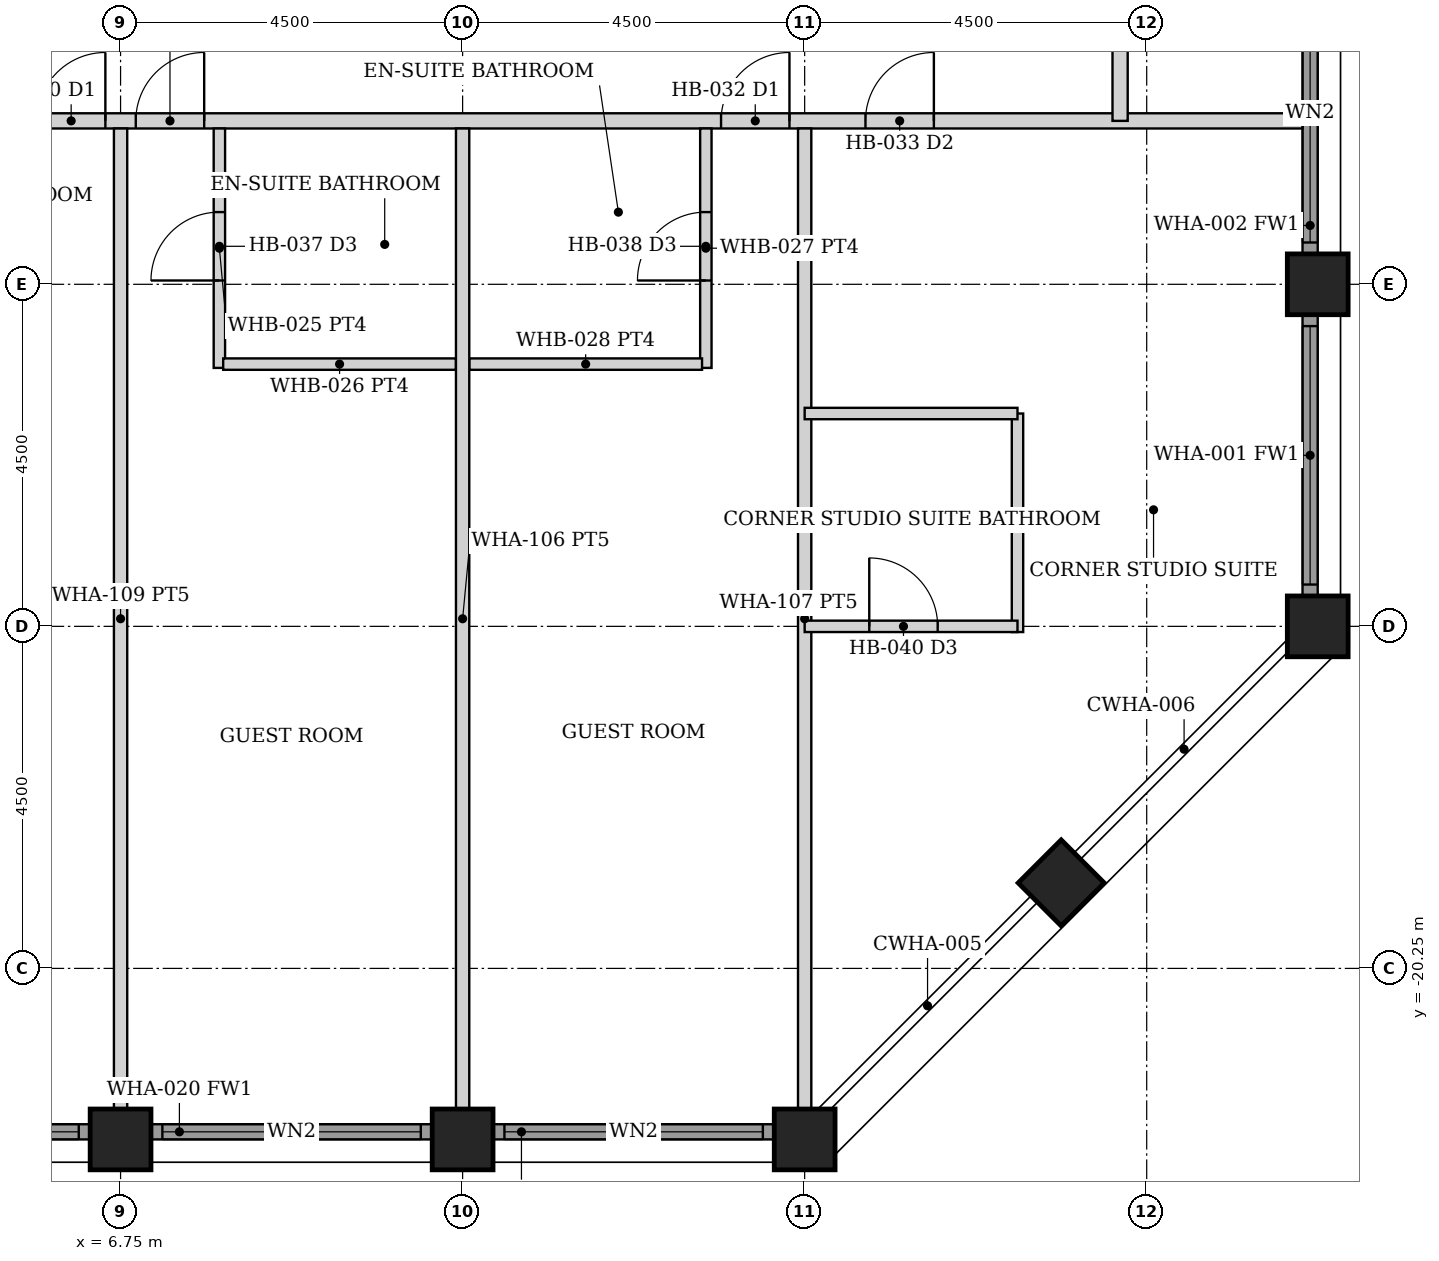
"""IFC4 building model, lengths in metres.
Left out: names, types, materials, properties, quantities, classifications, styles, units other than length and angle.
Written with IfcOpenShell. Run it as: python <this file> out.ifc"""

import sys

from ifc_helpers import new_model, si_unit, direction, frame, frame_2d, origin, origin_2d, place, context, subcontext, project, spatial, rectangle, hollow_rectangle, extrude, element, fill, save


model = new_model("IFC4")
c1 = context("Model", 3, precision=1e-05, world=origin(), true_north=direction((0.0, 1.0)))
c2 = subcontext(c1, "Body", "Model", "MODEL_VIEW")
j1 = project(units=[si_unit("LENGTHUNIT", "METRE"), si_unit("PLANEANGLEUNIT", "RADIAN")], contexts=[c1])
p1 = place(None, origin())
s1 = spatial("IfcSite", under=j1, at=p1, CompositionType="ELEMENT")
p2 = place(p1, origin())
s2 = spatial("IfcBuilding", under=s1, at=p2, CompositionType="ELEMENT")
p3 = place(p2, frame((0.0, 0.0, 129.2)))
s3 = spatial("IfcBuildingStorey", under=s2, at=p3, CompositionType="ELEMENT", Elevation=129.2)
for number, where, z_axis, x_axis in (
    (1, (22.5, -15.75, 0.0), (0.0, 0.0, 1.0), (1.0, 0.0, 0.0)),
    (2, (22.5, -11.25, 0.0), (0.0, 0.0, 1.0), (1.0, 0.0, 0.0)),
    (3, (6.75, -22.5, 0.0), (0.0, 0.0, 1.0), (0.0, 1.0, 0.0)),
    (4, (11.25, -22.5, 0.0), (0.0, 0.0, 1.0), (0.0, 1.0, 0.0)),
    (5, (15.75, -22.5, 0.0), (0.0, 0.0, 1.0), (0.0, 1.0, 0.0)),
    (6, (19.125, -19.125, 0.0), (0.0, 0.0, 1.0), (0.707, -0.707, 0.0)),
):
    element("IfcColumn", number, at=place(p3, frame(where, z_axis=z_axis, x_axis=x_axis)), inside=s3, PredefinedType="COLUMN", context=c2, shape_type="SweptSolid", body=[
        extrude(hollow_rectangle(XDim=0.8, YDim=0.8, WallThickness=0.06, at=origin_2d()), origin(), (0.0, 0.0, 1.0), 3.6),
    ])
p4 = place(p3, frame((2.655, -22.4, 0.0), z_axis=(0.0, 0.0, 1.0), x_axis=(1.0, 0.0, 0.0)))
e7 = element("IfcWall", 7, at=p4, inside=s3, PredefinedType="SOLIDWALL", context=c2, shape_type="SweptSolid", body=[
    extrude(rectangle(XDim=3.69, YDim=0.2, at=frame_2d((1.845, 0.0))), origin(), (0.0, 0.0, 1.0), 2.479),
])
p5 = place(p4, frame((0.145, 0.0, 0.3)))
e8 = element("IfcOpeningElement", 8, at=p5, cuts=e7, PredefinedType="OPENING", context=c2, shape_type="SweptSolid", body=[
    extrude(rectangle(XDim=3.4, YDim=2.029, at=frame_2d((1.7, 1.015))), frame((0.0, 0.11, 0.0), z_axis=(0.0, -1.0, 0.0), x_axis=(1.0, 0.0, 0.0)), (0.0, 0.0, 1.0), 0.22),
])
p6 = place(p3, frame((7.155, -22.4, 0.0), z_axis=(0.0, 0.0, 1.0), x_axis=(1.0, 0.0, 0.0)))
e9 = element("IfcWall", 9, at=p6, inside=s3, PredefinedType="SOLIDWALL", context=c2, shape_type="SweptSolid", body=[
    extrude(rectangle(XDim=3.69, YDim=0.2, at=frame_2d((1.845, 0.0))), origin(), (0.0, 0.0, 1.0), 2.479),
])
p7 = place(p6, frame((0.145, 0.0, 0.3)))
e10 = element("IfcOpeningElement", 10, at=p7, cuts=e9, PredefinedType="OPENING", context=c2, shape_type="SweptSolid", body=[
    extrude(rectangle(XDim=3.4, YDim=2.029, at=frame_2d((1.7, 1.015))), frame((0.0, 0.11, 0.0), z_axis=(0.0, -1.0, 0.0), x_axis=(1.0, 0.0, 0.0)), (0.0, 0.0, 1.0), 0.22),
])
p8 = place(p3, frame((11.655, -22.4, 0.0), z_axis=(0.0, 0.0, 1.0), x_axis=(1.0, 0.0, 0.0)))
e11 = element("IfcWall", 11, at=p8, inside=s3, PredefinedType="SOLIDWALL", context=c2, shape_type="SweptSolid", body=[
    extrude(rectangle(XDim=3.69, YDim=0.2, at=frame_2d((1.845, 0.0))), origin(), (0.0, 0.0, 1.0), 2.479),
])
p9 = place(p8, frame((0.145, 0.0, 0.3)))
e12 = element("IfcOpeningElement", 12, at=p9, cuts=e11, PredefinedType="OPENING", context=c2, shape_type="SweptSolid", body=[
    extrude(rectangle(XDim=3.4, YDim=2.029, at=frame_2d((1.7, 1.015))), frame((0.0, 0.11, 0.0), z_axis=(0.0, -1.0, 0.0), x_axis=(1.0, 0.0, 0.0)), (0.0, 0.0, 1.0), 0.22),
])
p10 = place(p3, frame((22.4, -15.345, 0.0), z_axis=(0.0, 0.0, 1.0), x_axis=(0.0, 1.0, 0.0)))
e13 = element("IfcWall", 13, at=p10, inside=s3, PredefinedType="SOLIDWALL", context=c2, shape_type="SweptSolid", body=[
    extrude(rectangle(XDim=3.69, YDim=0.2, at=frame_2d((1.845, 0.0))), origin(), (0.0, 0.0, 1.0), 2.479),
])
p11 = place(p10, frame((0.145, 0.0, 0.3)))
e14 = element("IfcOpeningElement", 14, at=p11, cuts=e13, PredefinedType="OPENING", context=c2, shape_type="SweptSolid", body=[
    extrude(rectangle(XDim=3.4, YDim=2.029, at=frame_2d((1.7, 1.015))), frame((0.0, 0.11, 0.0), z_axis=(0.0, -1.0, 0.0), x_axis=(1.0, 0.0, 0.0)), (0.0, 0.0, 1.0), 0.22),
])
p12 = place(p3, frame((22.4, -10.845, 0.0), z_axis=(0.0, 0.0, 1.0), x_axis=(0.0, 1.0, 0.0)))
e15 = element("IfcWall", 15, at=p12, inside=s3, PredefinedType="SOLIDWALL", context=c2, shape_type="SweptSolid", body=[
    extrude(rectangle(XDim=3.69, YDim=0.2, at=frame_2d((1.845, 0.0))), origin(), (0.0, 0.0, 1.0), 2.479),
])
p13 = place(p12, frame((0.145, 0.0, 0.3)))
e16 = element("IfcOpeningElement", 16, at=p13, cuts=e15, PredefinedType="OPENING", context=c2, shape_type="SweptSolid", body=[
    extrude(rectangle(XDim=3.4, YDim=2.029, at=frame_2d((1.7, 1.015))), frame((0.0, 0.11, 0.0), z_axis=(0.0, -1.0, 0.0), x_axis=(1.0, 0.0, 0.0)), (0.0, 0.0, 1.0), 0.22),
])
p14 = place(p3, frame((-22.3, -9.1, 0.0), z_axis=(0.0, 0.0, 1.0), x_axis=(1.0, 0.0, 0.0)))
e17 = element("IfcWall", 17, at=p14, inside=s3, PredefinedType="PARTITIONING", context=c2, shape_type="SweptSolid", body=[
    extrude(rectangle(XDim=44.6, YDim=0.2, at=frame_2d((22.3, 0.0))), origin(), (0.0, 0.0, 1.0), 2.473),
])
p15 = place(p14, frame((9.95, 0.0, 0.0)))
e18 = element("IfcOpeningElement", 18, at=p15, cuts=e17, PredefinedType="OPENING", context=c2, shape_type="SweptSolid", body=[
    extrude(rectangle(XDim=0.9, YDim=2.1, at=frame_2d((0.45, 1.05))), frame((0.0, 0.11, 0.0), z_axis=(0.0, -1.0, 0.0), x_axis=(1.0, 0.0, 0.0)), (0.0, 0.0, 1.0), 0.22),
])
p16 = place(p14, frame((11.25, 0.0, 0.0)))
e19 = element("IfcOpeningElement", 19, at=p16, cuts=e17, PredefinedType="OPENING", context=c2, shape_type="SweptSolid", body=[
    extrude(rectangle(XDim=0.9, YDim=2.1, at=frame_2d((0.45, 1.05))), frame((0.0, 0.11, 0.0), z_axis=(0.0, -1.0, 0.0), x_axis=(1.0, 0.0, 0.0)), (0.0, 0.0, 1.0), 0.22),
])
p17 = place(p14, frame((27.95, 0.0, 0.0)))
e20 = element("IfcOpeningElement", 20, at=p17, cuts=e17, PredefinedType="OPENING", context=c2, shape_type="SweptSolid", body=[
    extrude(rectangle(XDim=0.9, YDim=2.1, at=frame_2d((0.45, 1.05))), frame((0.0, 0.11, 0.0), z_axis=(0.0, -1.0, 0.0), x_axis=(1.0, 0.0, 0.0)), (0.0, 0.0, 1.0), 0.22),
])
p18 = place(p14, frame((29.25, 0.0, 0.0)))
e21 = element("IfcOpeningElement", 21, at=p18, cuts=e17, PredefinedType="OPENING", context=c2, shape_type="SweptSolid", body=[
    extrude(rectangle(XDim=0.9, YDim=2.1, at=frame_2d((0.45, 1.05))), frame((0.0, 0.11, 0.0), z_axis=(0.0, -1.0, 0.0), x_axis=(1.0, 0.0, 0.0)), (0.0, 0.0, 1.0), 0.22),
])
p19 = place(p14, frame((36.95, 0.0, 0.0)))
e22 = element("IfcOpeningElement", 22, at=p19, cuts=e17, PredefinedType="OPENING", context=c2, shape_type="SweptSolid", body=[
    extrude(rectangle(XDim=0.9, YDim=2.1, at=frame_2d((0.45, 1.05))), frame((0.0, 0.11, 0.0), z_axis=(0.0, -1.0, 0.0), x_axis=(1.0, 0.0, 0.0)), (0.0, 0.0, 1.0), 0.22),
])
p20 = place(p14, frame((38.85, 0.0, 0.0)))
e23 = element("IfcOpeningElement", 23, at=p20, cuts=e17, PredefinedType="OPENING", context=c2, shape_type="SweptSolid", body=[
    extrude(rectangle(XDim=0.9, YDim=2.1, at=frame_2d((0.45, 1.05))), frame((0.0, 0.11, 0.0), z_axis=(0.0, -1.0, 0.0), x_axis=(1.0, 0.0, 0.0)), (0.0, 0.0, 1.0), 0.22),
])
p21 = place(p14, frame((4.85, 0.0, 0.0)))
e24 = element("IfcOpeningElement", 24, at=p21, cuts=e17, PredefinedType="OPENING", context=c2, shape_type="SweptSolid", body=[
    extrude(rectangle(XDim=0.9, YDim=2.1, at=frame_2d((0.45, 1.05))), frame((0.0, 0.11, 0.0), z_axis=(0.0, -1.0, 0.0), x_axis=(1.0, 0.0, 0.0)), (0.0, 0.0, 1.0), 0.22),
])
p22 = place(p3, frame((19.9, -9.1, 0.0), z_axis=(0.0, 0.0, 1.0), x_axis=(0.0, 1.0, 0.0)))
e25 = element("IfcWall", 25, at=p22, inside=s3, PredefinedType="PARTITIONING", context=c2, shape_type="SweptSolid", body=[
    extrude(rectangle(XDim=18.2, YDim=0.2, at=frame_2d((9.1, 0.0))), origin(), (0.0, 0.0, 1.0), 2.473),
])
p23 = place(p22, frame((8.6, 0.0, 0.0)))
e26 = element("IfcOpeningElement", 26, at=p23, cuts=e25, PredefinedType="OPENING", context=c2, shape_type="SweptSolid", body=[
    extrude(rectangle(XDim=1.0, YDim=2.1, at=frame_2d((0.5, 1.05))), frame((0.0, 0.11, 0.0), z_axis=(0.0, -1.0, 0.0), x_axis=(1.0, 0.0, 0.0)), (0.0, 0.0, 1.0), 0.22),
])
p24 = place(p3, frame((8.05, -12.35, 0.0), z_axis=(0.0, 0.0, 1.0), x_axis=(0.0, 1.0, 0.0)))
e27 = element("IfcWall", 27, at=p24, inside=s3, PredefinedType="PARTITIONING", context=c2, shape_type="SweptSolid", body=[
    extrude(rectangle(XDim=3.15, YDim=0.15, at=frame_2d((1.575, 0.0))), origin(), (0.0, 0.0, 1.0), 2.473),
])
p25 = place(p24, frame((1.15, 0.0, 0.0)))
e28 = element("IfcOpeningElement", 28, at=p25, cuts=e27, PredefinedType="OPENING", context=c2, shape_type="SweptSolid", body=[
    extrude(rectangle(XDim=0.9, YDim=2.1, at=frame_2d((0.45, 1.05))), frame((0.0, 0.085, 0.0), z_axis=(0.0, -1.0, 0.0), x_axis=(1.0, 0.0, 0.0)), (0.0, 0.0, 1.0), 0.17),
])
p26 = place(p3, frame((8.1, -12.3, 0.0), z_axis=(0.0, 0.0, 1.0), x_axis=(1.0, 0.0, 0.0)))
e29 = element("IfcWall", 29, at=p26, inside=s3, PredefinedType="PARTITIONING", context=c2, shape_type="SweptSolid", body=[
    extrude(rectangle(XDim=3.062, YDim=0.15, at=frame_2d((1.531, 0.0))), origin(), (0.0, 0.0, 1.0), 2.473),
])
p27 = place(p3, frame((14.45, -12.35, 0.0), z_axis=(0.0, 0.0, 1.0), x_axis=(0.0, 1.0, 0.0)))
e30 = element("IfcWall", 30, at=p27, inside=s3, PredefinedType="PARTITIONING", context=c2, shape_type="SweptSolid", body=[
    extrude(rectangle(XDim=3.15, YDim=0.15, at=frame_2d((1.575, 0.0))), origin(), (0.0, 0.0, 1.0), 2.473),
])
p28 = place(p27, frame((1.15, 0.0, 0.0)))
e31 = element("IfcOpeningElement", 31, at=p28, cuts=e30, PredefinedType="OPENING", context=c2, shape_type="SweptSolid", body=[
    extrude(rectangle(XDim=0.9, YDim=2.1, at=frame_2d((0.45, 1.05))), frame((0.0, 0.085, 0.0), z_axis=(0.0, -1.0, 0.0), x_axis=(1.0, 0.0, 0.0)), (0.0, 0.0, 1.0), 0.17),
])
p29 = place(p3, frame((11.337, -12.3, 0.0), z_axis=(0.0, 0.0, 1.0), x_axis=(1.0, 0.0, 0.0)))
e32 = element("IfcWall", 32, at=p29, inside=s3, PredefinedType="PARTITIONING", context=c2, shape_type="SweptSolid", body=[
    extrude(rectangle(XDim=3.062, YDim=0.15, at=frame_2d((1.531, 0.0))), origin(), (0.0, 0.0, 1.0), 2.473),
])
for number, where, z_axis, x_axis in (
    (33, (6.75, -22.1, 0.0), (0.0, 0.0, 1.0), (0.0, 1.0, 0.0)),
    (34, (11.25, -22.1, 0.0), (0.0, 0.0, 1.0), (0.0, 1.0, 0.0)),
    (35, (15.75, -22.1, 0.0), (0.0, 0.0, 1.0), (0.0, 1.0, 0.0)),
):
    element("IfcWall", number, at=place(p3, frame(where, z_axis=z_axis, x_axis=x_axis)), inside=s3, PredefinedType="PARTITIONING", context=c2, shape_type="SweptSolid", body=[
        extrude(rectangle(XDim=12.9, YDim=0.175, at=frame_2d((6.45, 0.0))), origin(), (0.0, 0.0, 1.0), 2.473),
    ])
p30 = place(p3, frame((18.55, -15.825, 0.0), z_axis=(0.0, 0.0, 1.0), x_axis=(0.0, 1.0, 0.0)))
e36 = element("IfcWall", 36, at=p30, inside=s3, PredefinedType="PARTITIONING", context=c2, shape_type="SweptSolid", body=[
    extrude(rectangle(XDim=2.875, YDim=0.15, at=frame_2d((1.438, 0.0))), origin(), (0.0, 0.0, 1.0), 2.473),
])
p31 = place(p3, frame((15.75, -12.95, 0.0), z_axis=(0.0, 0.0, 1.0), x_axis=(1.0, 0.0, 0.0)))
e37 = element("IfcWall", 37, at=p31, inside=s3, PredefinedType="PARTITIONING", context=c2, shape_type="SweptSolid", body=[
    extrude(rectangle(XDim=2.8, YDim=0.15, at=frame_2d((1.4, 0.0))), origin(), (0.0, 0.0, 1.0), 2.473),
])
p32 = place(p3, frame((15.75, -15.75, 0.0), z_axis=(0.0, 0.0, 1.0), x_axis=(1.0, 0.0, 0.0)))
e38 = element("IfcWall", 38, at=p32, inside=s3, PredefinedType="PARTITIONING", context=c2, shape_type="SweptSolid", body=[
    extrude(rectangle(XDim=2.8, YDim=0.15, at=frame_2d((1.4, 0.0))), origin(), (0.0, 0.0, 1.0), 2.473),
])
p33 = place(p32, frame((0.85, 0.0, 0.0)))
e39 = element("IfcOpeningElement", 39, at=p33, cuts=e38, PredefinedType="OPENING", context=c2, shape_type="SweptSolid", body=[
    extrude(rectangle(XDim=0.9, YDim=2.1, at=frame_2d((0.45, 1.05))), frame((0.0, 0.085, 0.0), z_axis=(0.0, -1.0, 0.0), x_axis=(1.0, 0.0, 0.0)), (0.0, 0.0, 1.0), 0.17),
])
p34 = place(p5, origin())
e40 = element("IfcWindow", 40, at=p34, inside=s3, PartitioningType="SINGLE_PANEL", PredefinedType="WINDOW", context=c2, shape_type="SweptSolid", body=[
    extrude(rectangle(XDim=3.4, YDim=2.029, at=frame_2d((1.7, 1.015))), frame((0.0, 0.03, 0.0), z_axis=(0.0, -1.0, 0.0), x_axis=(1.0, 0.0, 0.0)), (0.0, 0.0, 1.0), 0.06),
])
fill(e8, e40)
p35 = place(p7, origin())
e41 = element("IfcWindow", 41, at=p35, inside=s3, PartitioningType="SINGLE_PANEL", PredefinedType="WINDOW", context=c2, shape_type="SweptSolid", body=[
    extrude(rectangle(XDim=3.4, YDim=2.029, at=frame_2d((1.7, 1.015))), frame((0.0, 0.03, 0.0), z_axis=(0.0, -1.0, 0.0), x_axis=(1.0, 0.0, 0.0)), (0.0, 0.0, 1.0), 0.06),
])
fill(e10, e41)
p36 = place(p9, origin())
e42 = element("IfcWindow", 42, at=p36, inside=s3, PartitioningType="SINGLE_PANEL", PredefinedType="WINDOW", context=c2, shape_type="SweptSolid", body=[
    extrude(rectangle(XDim=3.4, YDim=2.029, at=frame_2d((1.7, 1.015))), frame((0.0, 0.03, 0.0), z_axis=(0.0, -1.0, 0.0), x_axis=(1.0, 0.0, 0.0)), (0.0, 0.0, 1.0), 0.06),
])
fill(e12, e42)
p37 = place(p11, origin())
e43 = element("IfcWindow", 43, at=p37, inside=s3, PartitioningType="SINGLE_PANEL", PredefinedType="WINDOW", context=c2, shape_type="SweptSolid", body=[
    extrude(rectangle(XDim=3.4, YDim=2.029, at=frame_2d((1.7, 1.015))), frame((0.0, 0.03, 0.0), z_axis=(0.0, -1.0, 0.0), x_axis=(1.0, 0.0, 0.0)), (0.0, 0.0, 1.0), 0.06),
])
fill(e14, e43)
p38 = place(p13, origin())
e44 = element("IfcWindow", 44, at=p38, inside=s3, PartitioningType="SINGLE_PANEL", PredefinedType="WINDOW", context=c2, shape_type="SweptSolid", body=[
    extrude(rectangle(XDim=3.4, YDim=2.029, at=frame_2d((1.7, 1.015))), frame((0.0, 0.03, 0.0), z_axis=(0.0, -1.0, 0.0), x_axis=(1.0, 0.0, 0.0)), (0.0, 0.0, 1.0), 0.06),
])
fill(e16, e44)
p39 = place(p17, origin())
e45 = element("IfcDoor", 45, at=p39, inside=s3, OperationType="SINGLE_SWING_RIGHT", PredefinedType="DOOR", context=c2, shape_type="SweptSolid", body=[
    extrude(rectangle(XDim=0.9, YDim=2.1, at=frame_2d((0.45, 1.05))), frame((0.0, 0.025, 0.0), z_axis=(0.0, -1.0, 0.0), x_axis=(1.0, 0.0, 0.0)), (0.0, 0.0, 1.0), 0.05),
])
fill(e20, e45)
p40 = place(p18, origin())
e46 = element("IfcDoor", 46, at=p40, inside=s3, OperationType="SINGLE_SWING_RIGHT", PredefinedType="DOOR", context=c2, shape_type="SweptSolid", body=[
    extrude(rectangle(XDim=0.9, YDim=2.1, at=frame_2d((0.45, 1.05))), frame((0.0, 0.025, 0.0), z_axis=(0.0, -1.0, 0.0), x_axis=(1.0, 0.0, 0.0)), (0.0, 0.0, 1.0), 0.05),
])
fill(e21, e46)
p41 = place(p25, origin())
e47 = element("IfcDoor", 47, at=p41, inside=s3, OperationType="SINGLE_SWING_LEFT", PredefinedType="DOOR", context=c2, shape_type="SweptSolid", body=[
    extrude(rectangle(XDim=0.9, YDim=2.1, at=frame_2d((0.45, 1.05))), frame((0.0, 0.025, 0.0), z_axis=(0.0, -1.0, 0.0), x_axis=(1.0, 0.0, 0.0)), (0.0, 0.0, 1.0), 0.05),
])
fill(e28, e47)
p42 = place(p19, origin())
e48 = element("IfcDoor", 48, at=p42, inside=s3, OperationType="SINGLE_SWING_RIGHT", PredefinedType="DOOR", context=c2, shape_type="SweptSolid", body=[
    extrude(rectangle(XDim=0.9, YDim=2.1, at=frame_2d((0.45, 1.05))), frame((0.0, 0.025, 0.0), z_axis=(0.0, -1.0, 0.0), x_axis=(1.0, 0.0, 0.0)), (0.0, 0.0, 1.0), 0.05),
])
fill(e22, e48)
p43 = place(p28, origin())
e49 = element("IfcDoor", 49, at=p43, inside=s3, OperationType="SINGLE_SWING_LEFT", PredefinedType="DOOR", context=c2, shape_type="SweptSolid", body=[
    extrude(rectangle(XDim=0.9, YDim=2.1, at=frame_2d((0.45, 1.05))), frame((0.0, 0.025, 0.0), z_axis=(0.0, -1.0, 0.0), x_axis=(1.0, 0.0, 0.0)), (0.0, 0.0, 1.0), 0.05),
])
fill(e31, e49)
p44 = place(p20, origin())
e50 = element("IfcDoor", 50, at=p44, inside=s3, OperationType="SINGLE_SWING_RIGHT", PredefinedType="DOOR", context=c2, shape_type="SweptSolid", body=[
    extrude(rectangle(XDim=0.9, YDim=2.1, at=frame_2d((0.45, 1.05))), frame((0.0, 0.025, 0.0), z_axis=(0.0, -1.0, 0.0), x_axis=(1.0, 0.0, 0.0)), (0.0, 0.0, 1.0), 0.05),
])
fill(e23, e50)
p45 = place(p33, origin())
e51 = element("IfcDoor", 51, at=p45, inside=s3, OperationType="SINGLE_SWING_LEFT", PredefinedType="DOOR", context=c2, shape_type="SweptSolid", body=[
    extrude(rectangle(XDim=0.9, YDim=2.1, at=frame_2d((0.45, 1.05))), frame((0.0, 0.025, 0.0), z_axis=(0.0, -1.0, 0.0), x_axis=(1.0, 0.0, 0.0)), (0.0, 0.0, 1.0), 0.05),
])
fill(e39, e51)
save(model, sys.argv[1])
